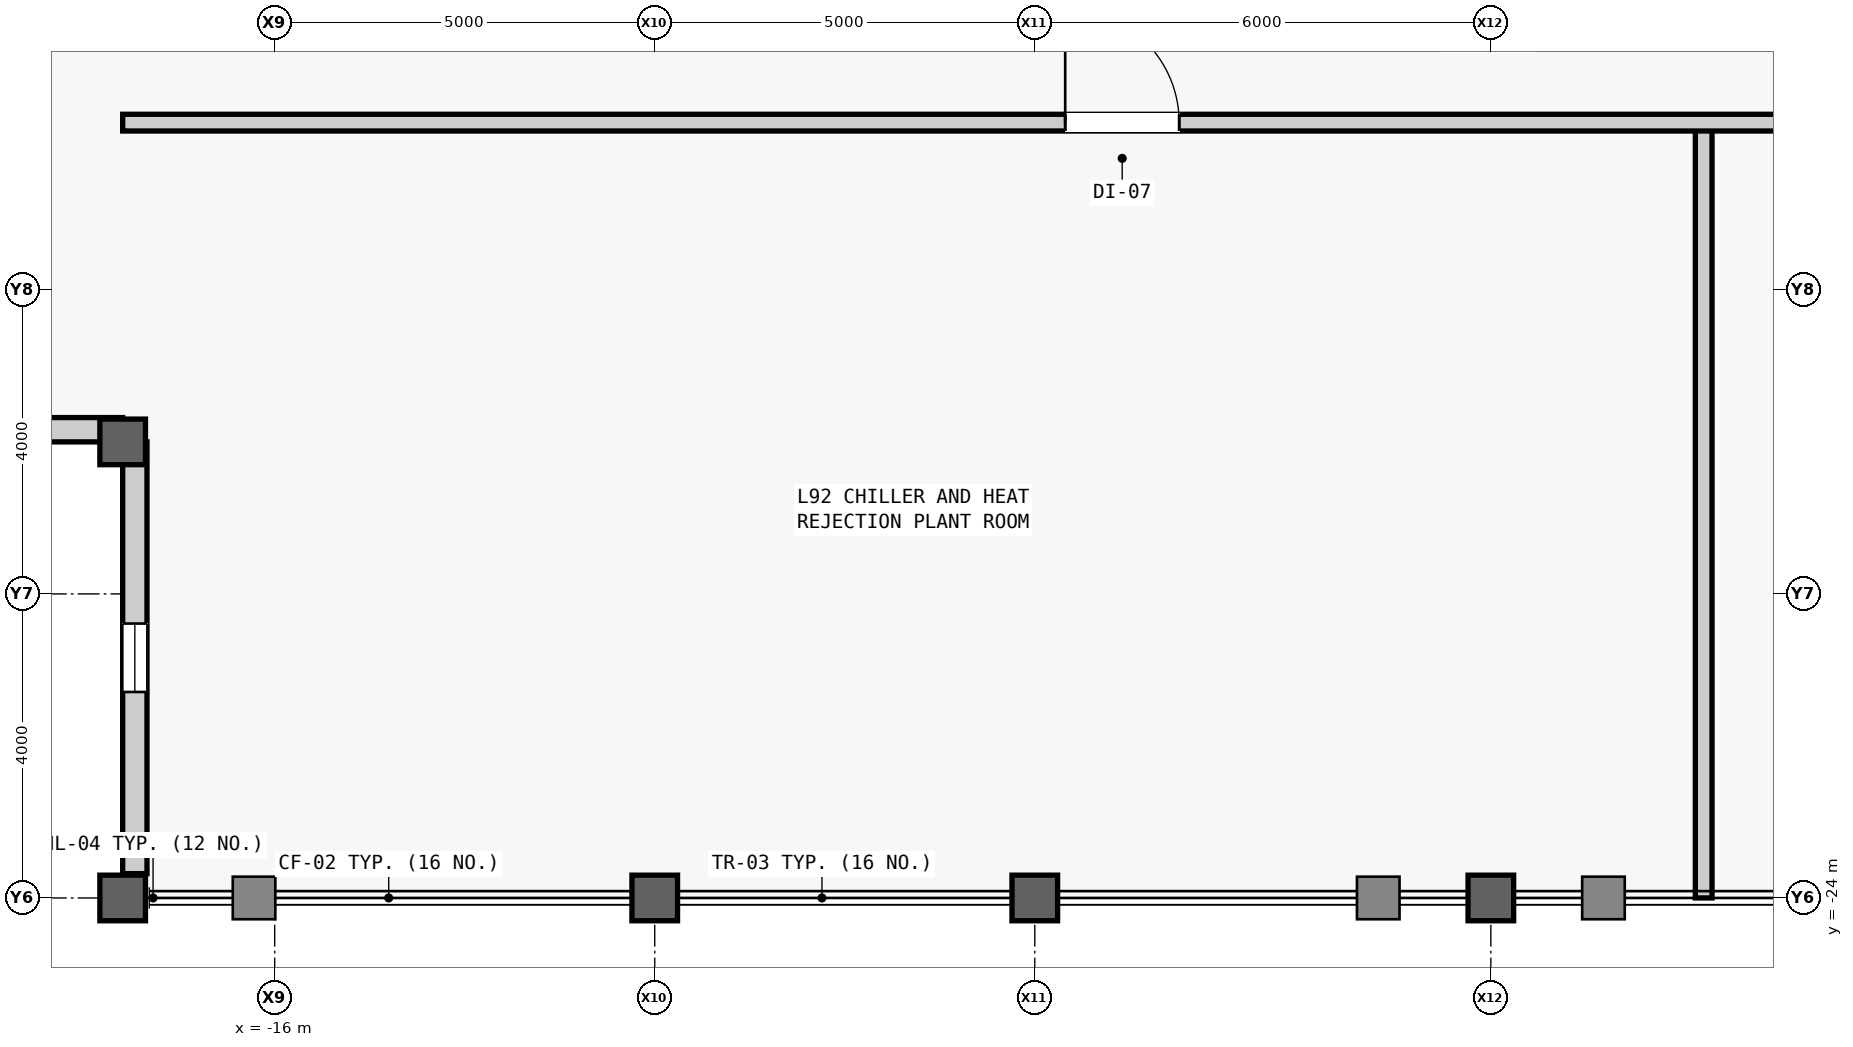
"""IFC4 building model, lengths in metres.
Left out: names, types, materials, properties, quantities, classifications, styles, units other than length and angle.
Written with IfcOpenShell. Run it as: python <this file> out.ifc"""

import sys

from ifc_helpers import new_model, si_unit, direction, frame, frame_2d, origin, origin_2d, place, context, subcontext, project, spatial, rectangle, hollow_rectangle, extrude, source, transform, mapped, element, fill, save


model = new_model("IFC4")
c1 = context("Model", 3, precision=1e-05, world=origin(), true_north=direction((0.0, 1.0)))
c2 = subcontext(c1, "Body", "Model", "MODEL_VIEW")
j1 = project(units=[si_unit("LENGTHUNIT", "METRE"), si_unit("PLANEANGLEUNIT", "RADIAN")], contexts=[c1])
p1 = place(None, origin())
s1 = spatial("IfcSite", under=j1, at=p1, CompositionType="ELEMENT")
p2 = place(p1, origin())
s2 = spatial("IfcBuilding", under=s1, at=p2, CompositionType="ELEMENT")
p3 = place(p2, frame((0.0, 0.0, 389.9)))
s3 = spatial("IfcBuildingStorey", under=s2, at=p3, CompositionType="ELEMENT", Elevation=389.9)
m1 = source(origin(), c2, "Body", "SweptSolid", [
    extrude(hollow_rectangle(XDim=0.6, YDim=0.6, WallThickness=0.035, at=origin_2d()), origin(), (0.0, 0.0, 1.0), 4.8),
])
for number, where, z_axis, x_axis in (
    (1, (-18.0, -24.0, 0.0), (0.0, 0.0, 1.0), (1.0, 0.0, 0.0)),
    (2, (-18.0, -18.0, 0.0), (0.0, 0.0, 1.0), (1.0, 0.0, 0.0)),
    (3, (-11.0, -24.0, 0.0), (0.0, 0.0, 1.0), (1.0, 0.0, 0.0)),
    (4, (-6.0, -24.0, 0.0), (0.0, 0.0, 1.0), (1.0, 0.0, 0.0)),
    (5, (0.0, -24.0, 0.0), (0.0, 0.0, 1.0), (1.0, 0.0, 0.0)),
):
    element("IfcColumn", number, at=place(p3, frame(where, z_axis=z_axis, x_axis=x_axis)), inside=s3, PredefinedType="COLUMN", context=c2, shape_type="MappedRepresentation", body=[
        mapped(m1, transform((0.0, 0.0, 0.0), scale=1.0)),
    ])
m2 = source(origin(), c2, "Body", "SweptSolid", [
    extrude(rectangle(XDim=5.68, YDim=0.32, at=frame_2d((2.84, 0.0))), origin(), (0.0, 0.0, 1.0), 3.901),
])
p4 = place(p3, frame((-18.0, -17.84, 0.0), z_axis=(0.0, 0.0, 1.0), x_axis=(-1.0, 0.0, 0.0)))
e6 = element("IfcWall", 6, at=p4, inside=s3, PredefinedType="STANDARD", context=c2, shape_type="MappedRepresentation", body=[
    mapped(m2, transform((0.0, 0.0, 0.0), scale=1.0)),
])
m3 = source(origin(), c2, "Body", "SweptSolid", [
    extrude(rectangle(XDim=0.9, YDim=2.4, at=frame_2d((0.45, 1.2))), frame((0.0, 0.17, 0.0), z_axis=(0.0, -1.0, 0.0), x_axis=(1.0, 0.0, 0.0)), (0.0, 0.0, 1.0), 0.34),
])
p5 = place(p4, frame((2.39, 0.0, 0.7)))
e7 = element("IfcOpeningElement", 7, at=p5, cuts=e6, PredefinedType="OPENING", context=c2, shape_type="MappedRepresentation", body=[
    mapped(m3, transform((0.0, 0.0, 0.0), scale=1.0)),
])
p6 = place(p3, frame((-17.84, -23.68, 0.0), z_axis=(0.0, 0.0, 1.0), x_axis=(0.0, 1.0, 0.0)))
e8 = element("IfcWall", 8, at=p6, inside=s3, PredefinedType="STANDARD", context=c2, shape_type="MappedRepresentation", body=[
    mapped(m2, transform((0.0, 0.0, 0.0), scale=1.0)),
])
p7 = place(p6, frame((2.39, 0.0, 0.7)))
e9 = element("IfcOpeningElement", 9, at=p7, cuts=e8, PredefinedType="OPENING", context=c2, shape_type="MappedRepresentation", body=[
    mapped(m3, transform((0.0, 0.0, 0.0), scale=1.0)),
])
m4 = source(origin(), c2, "Body", "SweptSolid", [
    extrude(rectangle(XDim=10.2, YDim=0.22, at=frame_2d((5.1, 0.0))), origin(), (0.0, 0.0, 1.0), 4.45),
])
p8 = place(p3, frame((2.8, -24.0, 0.0), z_axis=(0.0, 0.0, 1.0), x_axis=(0.0, 1.0, 0.0)))
e10 = element("IfcWall", 10, at=p8, inside=s3, PredefinedType="PARTITIONING", context=c2, shape_type="MappedRepresentation", body=[
    mapped(m4, transform((0.0, 0.0, 0.0), scale=1.0)),
])
m5 = source(origin(), c2, "Body", "SweptSolid", [
    extrude(rectangle(XDim=36.0, YDim=0.22, at=frame_2d((18.0, 0.0))), origin(), (0.0, 0.0, 1.0), 4.45),
])
p9 = place(p3, frame((-18.0, -13.8, 0.0), z_axis=(0.0, 0.0, 1.0), x_axis=(1.0, 0.0, 0.0)))
e11 = element("IfcWall", 11, at=p9, inside=s3, PredefinedType="PARTITIONING", context=c2, shape_type="MappedRepresentation", body=[
    mapped(m5, transform((0.0, 0.0, 0.0), scale=1.0)),
])
m6 = source(origin(), c2, "Body", "SweptSolid", [
    extrude(rectangle(XDim=1.5, YDim=2.3, at=frame_2d((0.75, 1.15))), frame((0.0, 0.12, 0.0), z_axis=(0.0, -1.0, 0.0), x_axis=(1.0, 0.0, 0.0)), (0.0, 0.0, 1.0), 0.24),
])
p10 = place(p9, frame((12.4, 0.0, 0.0)))
e12 = element("IfcOpeningElement", 12, at=p10, cuts=e11, PredefinedType="OPENING", context=c2, shape_type="MappedRepresentation", body=[
    mapped(m6, transform((0.0, 0.0, 0.0), scale=1.0)),
])
p11 = place(p9, frame((25.4, 0.0, 0.0)))
e13 = element("IfcOpeningElement", 13, at=p11, cuts=e11, PredefinedType="OPENING", context=c2, shape_type="MappedRepresentation", body=[
    mapped(m6, transform((0.0, 0.0, 0.0), scale=1.0)),
])
m7 = source(origin(), c2, "Body", "SweptSolid", [
    extrude(rectangle(XDim=0.9, YDim=2.4, at=frame_2d((0.45, 1.2))), frame((0.0, 0.03, 0.0), z_axis=(0.0, -1.0, 0.0), x_axis=(1.0, 0.0, 0.0)), (0.0, 0.0, 1.0), 0.06),
])
p12 = place(p7, origin())
e14 = element("IfcWindow", 14, at=p12, inside=s3, PartitioningType="SINGLE_PANEL", PredefinedType="WINDOW", context=c2, shape_type="MappedRepresentation", body=[
    mapped(m7, transform((0.0, 0.0, 0.0), scale=1.0)),
])
fill(e9, e14)
m8 = source(origin(), c2, "Body", "SweptSolid", [
    extrude(rectangle(XDim=1.5, YDim=2.3, at=frame_2d((0.75, 1.15))), frame((0.0, 0.025, 0.0), z_axis=(0.0, -1.0, 0.0), x_axis=(1.0, 0.0, 0.0)), (0.0, 0.0, 1.0), 0.05),
])
p13 = place(p10, origin())
e15 = element("IfcDoor", 15, at=p13, inside=s3, OperationType="SINGLE_SWING_LEFT", PredefinedType="DOOR", context=c2, shape_type="MappedRepresentation", body=[
    mapped(m8, transform((0.0, 0.0, 0.0), scale=1.0)),
])
fill(e12, e15)
save(model, sys.argv[1])
